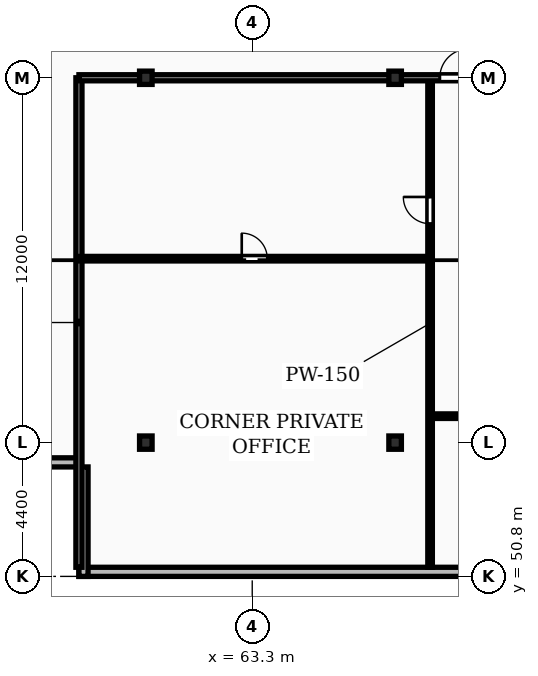
"""IFC4 building model, lengths in metres.
Left out: names, types, materials, properties, quantities, classifications, styles, units other than length and angle.
Written with IfcOpenShell. Run it as: python <this file> out.ifc"""

import sys

from ifc_helpers import new_model, si_unit, direction, frame, frame_2d, origin, origin_2d, place, context, subcontext, project, spatial, rectangle, i_section, extrude, element, fill, save


model = new_model("IFC4")
c1 = context("Model", 3, precision=1e-05, world=origin(), true_north=direction((0.0, 1.0)))
c2 = subcontext(c1, "Body", "Model", "MODEL_VIEW")
j1 = project(units=[si_unit("LENGTHUNIT", "METRE"), si_unit("PLANEANGLEUNIT", "RADIAN")], contexts=[c1])
p1 = place(None, origin())
s1 = spatial("IfcSite", under=j1, at=p1, CompositionType="ELEMENT")
p2 = place(p1, origin())
s2 = spatial("IfcBuilding", under=s1, at=p2, CompositionType="ELEMENT")
p3 = place(p2, frame((0.0, 0.0, 146.5)))
s3 = spatial("IfcBuildingStorey", under=s2, at=p3, CompositionType="ELEMENT", Elevation=146.5)
for number, where, z_axis, x_axis in (
    (1, (59.8, 55.2, 0.0), (0.0, 0.0, 1.0), (1.0, 0.0, 0.0)),
    (2, (59.8, 67.2, 0.0), (0.0, 0.0, 1.0), (1.0, 0.0, 0.0)),
    (3, (68.0, 55.2, 0.0), (0.0, 0.0, 1.0), (1.0, 0.0, 0.0)),
    (4, (68.0, 67.2, 0.0), (0.0, 0.0, 1.0), (1.0, 0.0, 0.0)),
):
    element("IfcColumn", number, at=place(p3, frame(where, z_axis=z_axis, x_axis=x_axis)), inside=s3, PredefinedType="COLUMN", context=c2, shape_type="SweptSolid", body=[
        extrude(i_section(OverallWidth=0.412, OverallDepth=0.437, WebThickness=0.036, FlangeThickness=0.052, FilletRadius=0.015, at=origin_2d()), origin(), (0.0, 0.0, 1.0), 3.6),
    ])
p4 = place(p3, frame((57.6, 50.95, 0.0), z_axis=(0.0, 0.0, 1.0), x_axis=(1.0, 0.0, 0.0)))
e5 = element("IfcWall", 5, at=p4, inside=s3, PredefinedType="STANDARD", context=c2, shape_type="SweptSolid", body=[
    extrude(rectangle(XDim=73.0, YDim=0.3, at=frame_2d((36.5, 0.0))), origin(), (0.0, 0.0, 1.0), 3.31),
])
p5 = place(p4, frame((15.225, 0.0, 0.85)))
e6 = element("IfcOpeningElement", 6, at=p5, cuts=e5, PredefinedType="OPENING", context=c2, shape_type="SweptSolid", body=[
    extrude(rectangle(XDim=1.8, YDim=1.8, at=frame_2d((0.9, 0.9))), frame((0.0, 0.16, 0.0), z_axis=(0.0, -1.0, 0.0), x_axis=(1.0, 0.0, 0.0)), (0.0, 0.0, 1.0), 0.32),
])
p6 = place(p4, frame((58.575, 0.0, 0.85)))
e7 = element("IfcOpeningElement", 7, at=p6, cuts=e5, PredefinedType="OPENING", context=c2, shape_type="SweptSolid", body=[
    extrude(rectangle(XDim=1.8, YDim=1.8, at=frame_2d((0.9, 0.9))), frame((0.0, 0.16, 0.0), z_axis=(0.0, -1.0, 0.0), x_axis=(1.0, 0.0, 0.0)), (0.0, 0.0, 1.0), 0.32),
])
p7 = place(p4, frame((33.45, 0.0, 0.0)))
e8 = element("IfcOpeningElement", 8, at=p7, cuts=e5, PredefinedType="OPENING", context=c2, shape_type="SweptSolid", body=[
    extrude(rectangle(XDim=1.1, YDim=2.1, at=frame_2d((0.55, 1.05))), frame((0.0, 0.16, 0.0), z_axis=(0.0, -1.0, 0.0), x_axis=(1.0, 0.0, 0.0)), (0.0, 0.0, 1.0), 0.32),
])
p8 = place(p3, frame((54.0, 54.55, 0.0), z_axis=(0.0, 0.0, 1.0), x_axis=(1.0, 0.0, 0.0)))
e9 = element("IfcWall", 9, at=p8, inside=s3, PredefinedType="STANDARD", context=c2, shape_type="SweptSolid", body=[
    extrude(rectangle(XDim=3.6, YDim=0.3, at=frame_2d((1.8, 0.0))), origin(), (0.0, 0.0, 1.0), 3.31),
])
p9 = place(p3, frame((57.75, 54.4, 0.0), z_axis=(0.0, 0.0, 1.0), x_axis=(0.0, -1.0, 0.0)))
e10 = element("IfcWall", 10, at=p9, inside=s3, PredefinedType="STANDARD", context=c2, shape_type="SweptSolid", body=[
    extrude(rectangle(XDim=3.6, YDim=0.3, at=frame_2d((1.8, 0.0))), origin(), (0.0, 0.0, 1.0), 3.31),
])
p10 = place(p3, frame((57.6, 51.1, 0.0), z_axis=(0.0, 0.0, 1.0), x_axis=(0.0, 1.0, 0.0)))
e11 = element("IfcWall", 11, at=p10, inside=s3, PredefinedType="PARTITIONING", context=c2, shape_type="SweptSolid", body=[
    extrude(rectangle(XDim=16.1, YDim=0.2, at=frame_2d((8.05, 0.0))), origin(), (0.0, 0.0, 1.0), 3.31),
])
p11 = place(p3, frame((57.6, 61.25, 0.0), z_axis=(0.0, 0.0, 1.0), x_axis=(1.0, 0.0, 0.0)))
e12 = element("IfcWall", 12, at=p11, inside=s3, PredefinedType="PARTITIONING", context=c2, shape_type="SweptSolid", body=[
    extrude(rectangle(XDim=11.55, YDim=0.15, at=frame_2d((5.775, 0.0))), origin(), (0.0, 0.0, 1.0), 3.31),
])
p12 = place(p11, frame((5.355, 0.0, 0.0)))
e13 = element("IfcOpeningElement", 13, at=p12, cuts=e12, PredefinedType="OPENING", context=c2, shape_type="SweptSolid", body=[
    extrude(rectangle(XDim=0.84, YDim=2.04, at=frame_2d((0.42, 1.02))), frame((0.0, 0.085, 0.0), z_axis=(0.0, -1.0, 0.0), x_axis=(1.0, 0.0, 0.0)), (0.0, 0.0, 1.0), 0.17),
])
p13 = place(p3, frame((69.15, 51.1, 0.0), z_axis=(0.0, 0.0, 1.0), x_axis=(0.0, 1.0, 0.0)))
e14 = element("IfcWall", 14, at=p13, inside=s3, PredefinedType="PARTITIONING", context=c2, shape_type="SweptSolid", body=[
    extrude(rectangle(XDim=16.05, YDim=0.15, at=frame_2d((8.025, 0.0))), origin(), (0.0, 0.0, 1.0), 3.31),
])
p14 = place(p13, frame((11.3, 0.0, 0.0)))
e15 = element("IfcOpeningElement", 15, at=p14, cuts=e14, PredefinedType="OPENING", context=c2, shape_type="SweptSolid", body=[
    extrude(rectangle(XDim=0.88, YDim=2.06, at=frame_2d((0.44, 1.03))), frame((0.0, 0.085, 0.0), z_axis=(0.0, -1.0, 0.0), x_axis=(1.0, 0.0, 0.0)), (0.0, 0.0, 1.0), 0.17),
])
p15 = place(p3, frame((69.17, 56.07, 0.0), z_axis=(0.0, 0.0, 1.0), x_axis=(1.0, 0.0, 0.0)))
e16 = element("IfcWall", 16, at=p15, inside=s3, PredefinedType="PARTITIONING", context=c2, shape_type="SweptSolid", body=[
    extrude(rectangle(XDim=6.76, YDim=0.15, at=frame_2d((3.38, 0.0))), origin(), (0.0, 0.0, 1.0), 3.31),
])
p16 = place(p15, frame((1.362, 0.0, 0.0)))
e17 = element("IfcOpeningElement", 17, at=p16, cuts=e16, PredefinedType="OPENING", context=c2, shape_type="SweptSolid", body=[
    extrude(rectangle(XDim=0.84, YDim=2.04, at=frame_2d((0.42, 1.02))), frame((0.0, 0.085, 0.0), z_axis=(0.0, -1.0, 0.0), x_axis=(1.0, 0.0, 0.0)), (0.0, 0.0, 1.0), 0.17),
])
p17 = place(p15, frame((4.277, 0.0, 0.0)))
e18 = element("IfcOpeningElement", 18, at=p17, cuts=e16, PredefinedType="OPENING", context=c2, shape_type="SweptSolid", body=[
    extrude(rectangle(XDim=0.88, YDim=2.06, at=frame_2d((0.44, 1.03))), frame((0.0, 0.085, 0.0), z_axis=(0.0, -1.0, 0.0), x_axis=(1.0, 0.0, 0.0)), (0.0, 0.0, 1.0), 0.17),
])
p18 = place(p3, frame((57.6, 67.2, 0.0), z_axis=(0.0, 0.0, 1.0), x_axis=(1.0, 0.0, 0.0)))
e19 = element("IfcWall", 19, at=p18, inside=s3, PredefinedType="PARTITIONING", context=c2, shape_type="SweptSolid", body=[
    extrude(rectangle(XDim=18.35, YDim=0.2, at=frame_2d((9.175, 0.0))), origin(), (0.0, 0.0, 1.0), 2.773),
])
p19 = place(p18, frame((11.87, 0.0, 0.0)))
e20 = element("IfcOpeningElement", 20, at=p19, cuts=e19, PredefinedType="OPENING", context=c2, shape_type="SweptSolid", body=[
    extrude(rectangle(XDim=0.95, YDim=2.15, at=frame_2d((0.475, 1.075))), frame((0.0, 0.11, 0.0), z_axis=(0.0, -1.0, 0.0), x_axis=(1.0, 0.0, 0.0)), (0.0, 0.0, 1.0), 0.22),
])
p20 = place(p12, origin())
e21 = element("IfcDoor", 21, at=p20, inside=s3, OperationType="SINGLE_SWING_LEFT", PredefinedType="DOOR", context=c2, shape_type="SweptSolid", body=[
    extrude(rectangle(XDim=0.84, YDim=2.04, at=frame_2d((0.42, 1.02))), frame((0.0, 0.025, 0.0), z_axis=(0.0, -1.0, 0.0), x_axis=(1.0, 0.0, 0.0)), (0.0, 0.0, 1.0), 0.05),
])
fill(e13, e21)
p21 = place(p14, origin())
e22 = element("IfcDoor", 22, at=p21, inside=s3, OperationType="SINGLE_SWING_RIGHT", PredefinedType="DOOR", context=c2, shape_type="SweptSolid", body=[
    extrude(rectangle(XDim=0.88, YDim=2.06, at=frame_2d((0.44, 1.03))), frame((0.0, 0.025, 0.0), z_axis=(0.0, -1.0, 0.0), x_axis=(1.0, 0.0, 0.0)), (0.0, 0.0, 1.0), 0.05),
])
fill(e15, e22)
p22 = place(p19, origin())
e23 = element("IfcDoor", 23, at=p22, inside=s3, OperationType="SINGLE_SWING_RIGHT", PredefinedType="DOOR", context=c2, shape_type="SweptSolid", body=[
    extrude(rectangle(XDim=0.95, YDim=2.15, at=frame_2d((0.475, 1.075))), frame((0.0, 0.025, 0.0), z_axis=(0.0, -1.0, 0.0), x_axis=(1.0, 0.0, 0.0)), (0.0, 0.0, 1.0), 0.05),
])
fill(e20, e23)
save(model, sys.argv[1])
